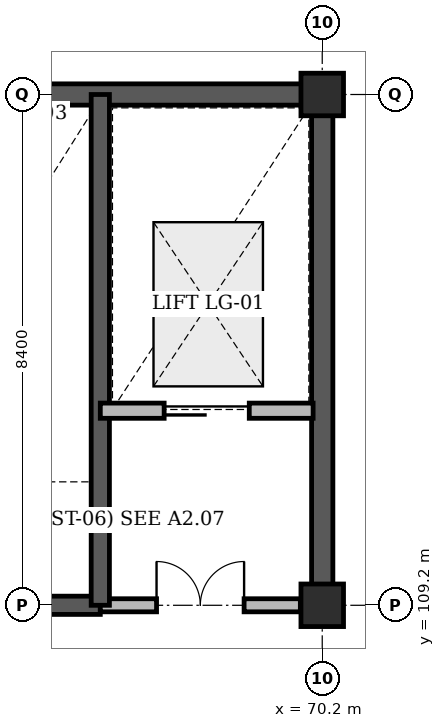
"""IFC4 building model, lengths in metres.
Left out: names, types, materials, properties, quantities, classifications, styles, units other than length and angle.
Written with IfcOpenShell. Run it as: python <this file> out.ifc"""

import sys

from ifc_helpers import new_model, si_unit, direction, frame, frame_2d, origin, origin_2d, place, context, subcontext, project, spatial, rectangle, extrude, element, fill, save


model = new_model("IFC4")
c1 = context("Model", 3, precision=1e-05, world=origin(), true_north=direction((0.0, 1.0)))
c2 = subcontext(c1, "Body", "Model", "MODEL_VIEW")
j1 = project(units=[si_unit("LENGTHUNIT", "METRE"), si_unit("PLANEANGLEUNIT", "RADIAN")], contexts=[c1])
p1 = place(None, origin())
s1 = spatial("IfcSite", under=j1, at=p1, CompositionType="ELEMENT")
p2 = place(p1, origin())
s2 = spatial("IfcBuilding", under=s1, at=p2, CompositionType="ELEMENT")
p3 = place(p2, frame((0.0, 0.0, 14.4)))
s3 = spatial("IfcBuildingStorey", under=s2, at=p3, CompositionType="ELEMENT", Elevation=14.4)
p4 = place(p3, frame((62.225, 117.6, 0.0), z_axis=(0.0, 0.0, 1.0), x_axis=(1.0, 0.0, 0.0)))
e1 = element("IfcWall", 1, at=p4, inside=s3, PredefinedType="SHEAR", context=c2, shape_type="SweptSolid", body=[
    extrude(rectangle(XDim=8.15, YDim=0.35, at=frame_2d((4.075, 0.0))), origin(), (0.0, 0.0, 1.0), 3.6),
])
p5 = place(p3, frame((70.2, 109.2, 0.0), z_axis=(0.0, 0.0, 1.0), x_axis=(0.0, 1.0, 0.0)))
e2 = element("IfcWall", 2, at=p5, inside=s3, PredefinedType="SHEAR", context=c2, shape_type="SweptSolid", body=[
    extrude(rectangle(XDim=8.4, YDim=0.35, at=frame_2d((4.2, 0.0))), origin(), (0.0, 0.0, 1.0), 3.6),
])
for number, where, z_axis, x_axis in (
    (3, (70.2, 109.2, 0.0), (0.0, 0.0, 1.0), (1.0, 0.0, 0.0)),
    (4, (70.2, 117.6, 0.0), (0.0, 0.0, 1.0), (1.0, 0.0, 0.0)),
):
    element("IfcColumn", number, at=place(p3, frame(where, z_axis=z_axis, x_axis=x_axis)), inside=s3, PredefinedType="COLUMN", context=c2, shape_type="SweptSolid", body=[
        extrude(rectangle(XDim=0.7, YDim=0.7, at=origin_2d()), origin(), (0.0, 0.0, 1.0), 3.6),
    ])
p6 = place(p3, frame((62.4, 109.2, 0.0), z_axis=(0.0, 0.0, 1.0), x_axis=(1.0, 0.0, 0.0)))
e5 = element("IfcWall", 5, at=p6, inside=s3, PredefinedType="SHEAR", context=c2, shape_type="SweptSolid", body=[
    extrude(rectangle(XDim=4.15, YDim=0.3, at=frame_2d((2.075, 0.0))), origin(), (0.0, 0.0, 1.0), 3.6),
])
p7 = place(p6, frame((1.515, 0.0, 0.0)))
e6 = element("IfcOpeningElement", 6, at=p7, cuts=e5, PredefinedType="OPENING", context=c2, shape_type="SweptSolid", body=[
    extrude(rectangle(XDim=1.12, YDim=2.15, at=frame_2d((0.56, 1.075))), frame((0.0, 0.16, 0.0), z_axis=(0.0, -1.0, 0.0), x_axis=(1.0, 0.0, 0.0)), (0.0, 0.0, 1.0), 0.32),
])
p8 = place(p3, frame((66.55, 109.2, 0.0), z_axis=(0.0, 0.0, 1.0), x_axis=(1.0, 0.0, 0.0)))
e7 = element("IfcWall", 7, at=p8, inside=s3, PredefinedType="STANDARD", context=c2, shape_type="SweptSolid", body=[
    extrude(rectangle(XDim=3.29, YDim=0.215, at=frame_2d((1.645, 0.0))), origin(), (0.0, 0.0, 1.0), 2.62),
])
p9 = place(p8, frame((0.925, 0.0, 0.0)))
e8 = element("IfcOpeningElement", 8, at=p9, cuts=e7, PredefinedType="OPENING", context=c2, shape_type="SweptSolid", body=[
    extrude(rectangle(XDim=1.44, YDim=2.2, at=frame_2d((0.72, 1.1))), frame((0.0, 0.118, 0.0), z_axis=(0.0, -1.0, 0.0), x_axis=(1.0, 0.0, 0.0)), (0.0, 0.0, 1.0), 0.235),
])
p10 = place(p3, frame((66.55, 109.2, 0.0), z_axis=(0.0, 0.0, 1.0), x_axis=(0.0, 1.0, 0.0)))
e9 = element("IfcWall", 9, at=p10, inside=s3, PredefinedType="SHEAR", context=c2, shape_type="SweptSolid", body=[
    extrude(rectangle(XDim=8.4, YDim=0.3, at=frame_2d((4.2, 0.0))), origin(), (0.0, 0.0, 1.0), 3.6),
])
p11 = place(p3, frame((66.55, 112.4, 0.0), z_axis=(0.0, 0.0, 1.0), x_axis=(1.0, 0.0, 0.0)))
e10 = element("IfcWall", 10, at=p11, inside=s3, PredefinedType="STANDARD", context=c2, shape_type="SweptSolid", body=[
    extrude(rectangle(XDim=3.5, YDim=0.25, at=frame_2d((1.75, 0.0))), origin(), (0.0, 0.0, 1.0), 3.3),
])
p12 = place(p11, frame((1.05, 0.0, 0.0)))
e11 = element("IfcOpeningElement", 11, at=p12, cuts=e10, PredefinedType="OPENING", context=c2, shape_type="SweptSolid", body=[
    extrude(rectangle(XDim=1.4, YDim=2.2, at=frame_2d((0.7, 1.1))), frame((0.0, 0.135, 0.0), z_axis=(0.0, -1.0, 0.0), x_axis=(1.0, 0.0, 0.0)), (0.0, 0.0, 1.0), 0.27),
])
p13 = place(p9, origin())
e12 = element("IfcDoor", 12, at=p13, inside=s3, OperationType="DOUBLE_DOOR_SINGLE_SWING", PredefinedType="DOOR", context=c2, shape_type="SweptSolid", body=[
    extrude(rectangle(XDim=1.44, YDim=2.2, at=frame_2d((0.72, 1.1))), frame((0.0, 0.025, 0.0), z_axis=(0.0, -1.0, 0.0), x_axis=(1.0, 0.0, 0.0)), (0.0, 0.0, 1.0), 0.05),
])
fill(e8, e12)
p14 = place(p12, origin())
e13 = element("IfcDoor", 13, at=p14, inside=s3, OperationType="SLIDING_TO_LEFT", PredefinedType="DOOR", context=c2, shape_type="SweptSolid", body=[
    extrude(rectangle(XDim=1.4, YDim=2.2, at=frame_2d((0.7, 1.1))), frame((0.0, 0.025, 0.0), z_axis=(0.0, -1.0, 0.0), x_axis=(1.0, 0.0, 0.0)), (0.0, 0.0, 1.0), 0.05),
])
fill(e11, e13)
save(model, sys.argv[1])
